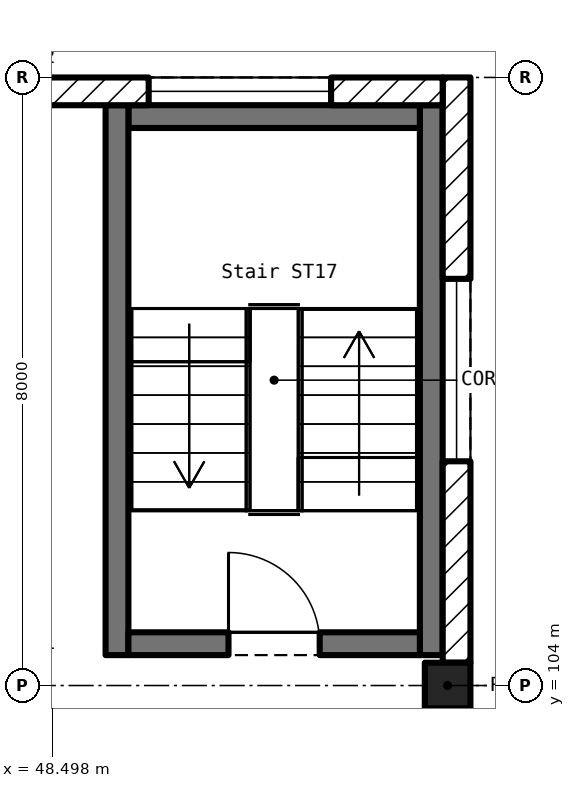
"""IFC4 building model, lengths in metres.
Left out: names, types, materials, properties, quantities, classifications, styles, units other than length and angle.
Written with IfcOpenShell. Run it as: python <this file> out.ifc"""

import sys

from ifc_helpers import new_model, si_unit, direction, frame, frame_2d, origin, origin_2d, place, context, subcontext, project, spatial, rectangle, extrude, element, fill, save


model = new_model("IFC4")
c1 = context("Model", 3, precision=1e-05, world=origin(), true_north=direction((0.0, 1.0)))
c2 = subcontext(c1, "Body", "Model", "MODEL_VIEW")
j1 = project(units=[si_unit("LENGTHUNIT", "METRE"), si_unit("PLANEANGLEUNIT", "RADIAN")], contexts=[c1])
p1 = place(None, origin())
s1 = spatial("IfcSite", under=j1, at=p1, CompositionType="ELEMENT")
p2 = place(p1, origin())
s2 = spatial("IfcBuilding", under=s1, at=p2, CompositionType="ELEMENT")
p3 = place(p2, frame((0.0, 0.0, 17.0)))
s3 = spatial("IfcBuildingStorey", under=s2, at=p3, CompositionType="ELEMENT", Elevation=17.0)
p4 = place(p3, frame((53.7, 104.0, 0.0), z_axis=(0.0, 0.0, 1.0), x_axis=(1.0, 0.0, 0.0)))
e1 = element("IfcColumn", 1, at=p4, inside=s3, PredefinedType="COLUMN", context=c2, shape_type="SweptSolid", body=[
    extrude(rectangle(XDim=0.6, YDim=0.6, at=origin_2d()), origin(), (0.0, 0.0, 1.0), 5.5),
])
p5 = place(p3, frame((53.818, 104.3, 0.0), z_axis=(0.0, 0.0, 1.0), x_axis=(0.0, 1.0, 0.0)))
e2 = element("IfcWall", 2, at=p5, inside=s3, PredefinedType="SOLIDWALL", context=c2, shape_type="SweptSolid", body=[
    extrude(rectangle(XDim=7.7, YDim=0.365, at=frame_2d((3.85, 0.0))), origin(), (0.0, 0.0, 1.0), 4.55),
])
p6 = place(p5, frame((2.65, 0.0, 1.0)))
e3 = element("IfcOpeningElement", 3, at=p6, cuts=e2, PredefinedType="OPENING", context=c2, shape_type="SweptSolid", body=[
    extrude(rectangle(XDim=2.4, YDim=2.0, at=frame_2d((1.2, 1.0))), frame((0.0, 0.195, 0.0), z_axis=(0.0, -1.0, 0.0), x_axis=(1.0, 0.0, 0.0)), (0.0, 0.0, 1.0), 0.389),
])
p7 = place(p3, frame((53.635, 111.817, 0.0), z_axis=(0.0, 0.0, 1.0), x_axis=(-1.0, 0.0, 0.0)))
e4 = element("IfcWall", 4, at=p7, inside=s3, PredefinedType="SOLIDWALL", context=c2, shape_type="SweptSolid", body=[
    extrude(rectangle(XDim=5.335, YDim=0.365, at=frame_2d((2.667, 0.0))), origin(), (0.0, 0.0, 1.0), 4.55),
])
p8 = place(p7, frame((1.468, 0.0, 1.0)))
e5 = element("IfcOpeningElement", 5, at=p8, cuts=e4, PredefinedType="OPENING", context=c2, shape_type="SweptSolid", body=[
    extrude(rectangle(XDim=2.4, YDim=2.0, at=frame_2d((1.2, 1.0))), frame((0.0, 0.195, 0.0), z_axis=(0.0, -1.0, 0.0), x_axis=(1.0, 0.0, 0.0)), (0.0, 0.0, 1.0), 0.389),
])
p9 = place(p3, frame((53.485, 104.4, 0.0), z_axis=(0.0, 0.0, 1.0), x_axis=(0.0, 1.0, 0.0)))
e6 = element("IfcWall", 6, at=p9, inside=s3, PredefinedType="SOLIDWALL", context=c2, shape_type="SweptSolid", body=[
    extrude(rectangle(XDim=7.235, YDim=0.3, at=frame_2d((3.618, 0.0))), origin(), (0.0, 0.0, 1.0), 5.5),
])
p10 = place(p3, frame((53.335, 111.485, 0.0), z_axis=(0.0, 0.0, 1.0), x_axis=(-1.0, 0.0, 0.0)))
e7 = element("IfcWall", 7, at=p10, inside=s3, PredefinedType="SOLIDWALL", context=c2, shape_type="SweptSolid", body=[
    extrude(rectangle(XDim=3.835, YDim=0.3, at=frame_2d((1.917, 0.0))), origin(), (0.0, 0.0, 1.0), 5.5),
])
p11 = place(p3, frame((49.35, 111.635, 0.0), z_axis=(0.0, 0.0, 1.0), x_axis=(0.0, -1.0, 0.0)))
e8 = element("IfcWall", 8, at=p11, inside=s3, PredefinedType="SOLIDWALL", context=c2, shape_type="SweptSolid", body=[
    extrude(rectangle(XDim=7.235, YDim=0.3, at=frame_2d((3.618, 0.0))), origin(), (0.0, 0.0, 1.0), 5.5),
])
p12 = place(p3, frame((49.5, 104.55, 0.0), z_axis=(0.0, 0.0, 1.0), x_axis=(1.0, 0.0, 0.0)))
e9 = element("IfcWall", 9, at=p12, inside=s3, PredefinedType="SOLIDWALL", context=c2, shape_type="SweptSolid", body=[
    extrude(rectangle(XDim=3.835, YDim=0.3, at=frame_2d((1.917, 0.0))), origin(), (0.0, 0.0, 1.0), 5.5),
])
p13 = place(p12, frame((1.317, 0.0, 0.0)))
e10 = element("IfcOpeningElement", 10, at=p13, cuts=e9, PredefinedType="OPENING", context=c2, shape_type="SweptSolid", body=[
    extrude(rectangle(XDim=1.2, YDim=2.1, at=frame_2d((0.6, 1.05))), frame((0.0, 0.162, 0.0), z_axis=(0.0, -1.0, 0.0), x_axis=(1.0, 0.0, 0.0)), (0.0, 0.0, 1.0), 0.324),
])
p14 = place(p6, origin())
e11 = element("IfcWindow", 11, at=p14, inside=s3, PartitioningType="DOUBLE_PANEL_VERTICAL", PredefinedType="WINDOW", context=c2, shape_type="SweptSolid", body=[
    extrude(rectangle(XDim=2.4, YDim=2.0, at=frame_2d((1.2, 1.0))), frame((0.0, 0.03, 0.0), z_axis=(0.0, -1.0, 0.0), x_axis=(1.0, 0.0, 0.0)), (0.0, 0.0, 1.0), 0.06),
])
fill(e3, e11)
p15 = place(p8, origin())
e12 = element("IfcWindow", 12, at=p15, inside=s3, PartitioningType="DOUBLE_PANEL_VERTICAL", PredefinedType="WINDOW", context=c2, shape_type="SweptSolid", body=[
    extrude(rectangle(XDim=2.4, YDim=2.0, at=frame_2d((1.2, 1.0))), frame((0.0, 0.03, 0.0), z_axis=(0.0, -1.0, 0.0), x_axis=(1.0, 0.0, 0.0)), (0.0, 0.0, 1.0), 0.06),
])
fill(e5, e12)
p16 = place(p13, origin())
e13 = element("IfcDoor", 13, at=p16, inside=s3, OperationType="SINGLE_SWING_LEFT", PredefinedType="DOOR", context=c2, shape_type="SweptSolid", body=[
    extrude(rectangle(XDim=1.2, YDim=2.1, at=frame_2d((0.6, 1.05))), frame((0.0, 0.025, 0.0), z_axis=(0.0, -1.0, 0.0), x_axis=(1.0, 0.0, 0.0)), (0.0, 0.0, 1.0), 0.05),
])
fill(e10, e13)
save(model, sys.argv[1])
